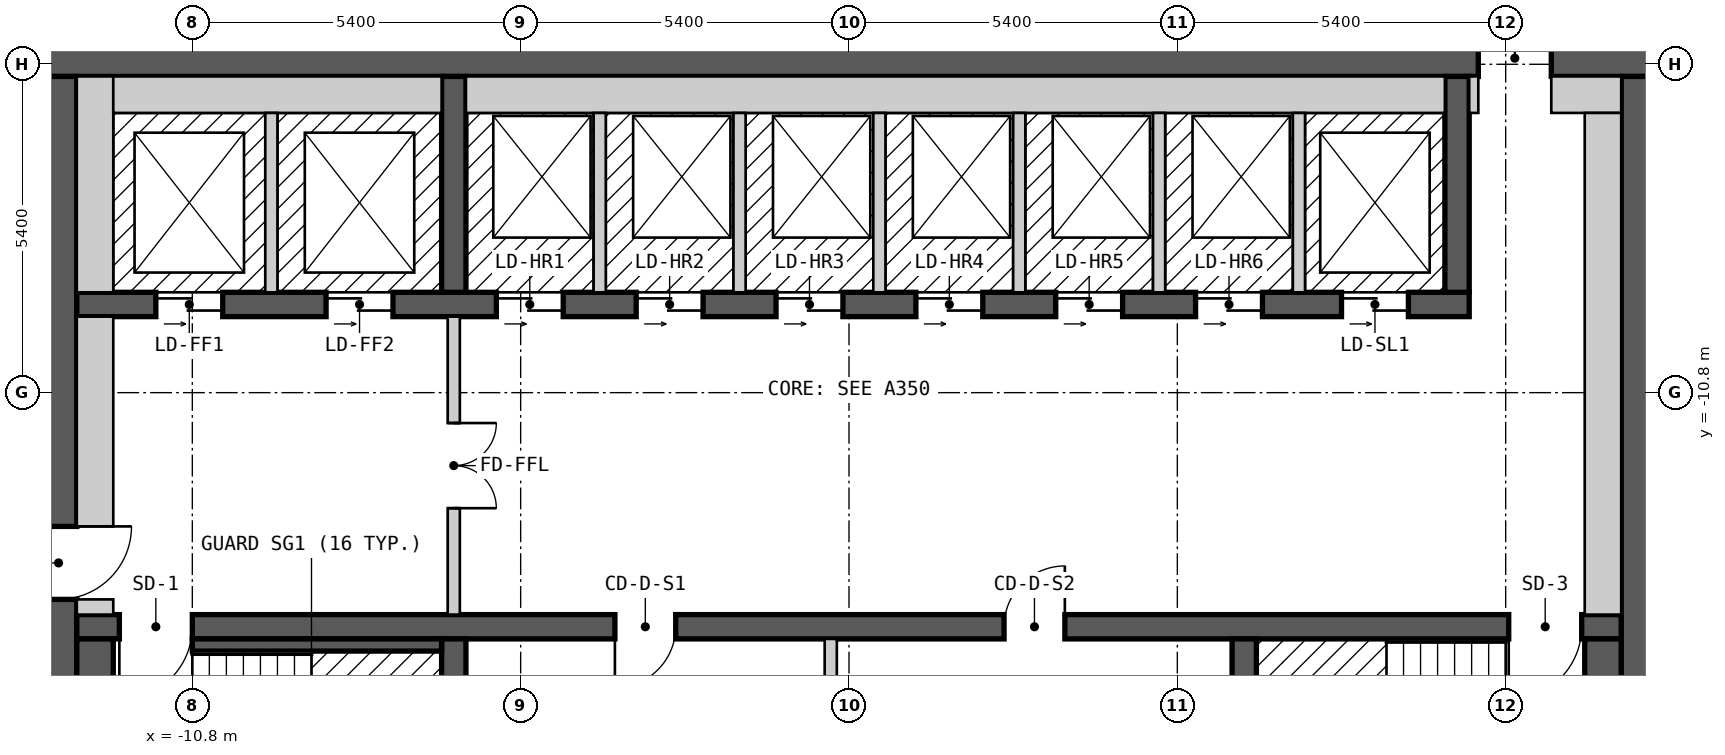
"""IFC4 building model, lengths in metres.
Left out: names, types, materials, properties, quantities, classifications, styles, units other than length and angle.
Written with IfcOpenShell. Run it as: python <this file> out.ifc"""

import sys

from ifc_helpers import new_model, si_unit, direction, frame, frame_2d, origin, place, context, subcontext, project, spatial, rectangle, extrude, element, fill, save


model = new_model("IFC4")
c1 = context("Model", 3, precision=1e-05, world=origin(), true_north=direction((0.0, 1.0)))
c2 = subcontext(c1, "Body", "Model", "MODEL_VIEW")
j1 = project(units=[si_unit("LENGTHUNIT", "METRE"), si_unit("PLANEANGLEUNIT", "RADIAN")], contexts=[c1])
p1 = place(None, origin())
s1 = spatial("IfcSite", under=j1, at=p1, CompositionType="ELEMENT")
p2 = place(p1, origin())
s2 = spatial("IfcBuilding", under=s1, at=p2, CompositionType="ELEMENT")
p3 = place(p2, frame((0.0, 0.0, 184.2)))
s3 = spatial("IfcBuildingStorey", under=s2, at=p3, CompositionType="ELEMENT", Elevation=184.2)
p4 = place(p3, frame((-13.3, -5.3, 0.0), z_axis=(0.0, 0.0, 1.0), x_axis=(1.0, 0.0, 0.0)))
e1 = element("IfcWall", 1, at=p4, inside=s3, PredefinedType="SHEAR", context=c2, shape_type="SweptSolid", body=[
    extrude(rectangle(XDim=26.6, YDim=0.6, at=frame_2d((13.3, 0.0))), origin(), (0.0, 0.0, 1.0), 2.7),
])
p5 = place(p4, frame((23.65, 0.0, 0.0)))
e2 = element("IfcOpeningElement", 2, at=p5, cuts=e1, PredefinedType="OPENING", context=c2, shape_type="SweptSolid", body=[
    extrude(rectangle(XDim=1.2, YDim=2.1, at=frame_2d((0.6, 1.05))), frame((0.0, 0.31, 0.0), z_axis=(0.0, -1.0, 0.0), x_axis=(1.0, 0.0, 0.0)), (0.0, 0.0, 1.0), 0.62),
])
p6 = place(p3, frame((-13.0, -18.4, 0.0), z_axis=(0.0, 0.0, 1.0), x_axis=(0.0, 1.0, 0.0)))
e3 = element("IfcWall", 3, at=p6, inside=s3, PredefinedType="SHEAR", context=c2, shape_type="SweptSolid", body=[
    extrude(rectangle(XDim=12.8, YDim=0.6, at=frame_2d((6.4, 0.0))), origin(), (0.0, 0.0, 1.0), 2.7),
])
p7 = place(p6, frame((4.2, 0.0, 0.0)))
e4 = element("IfcOpeningElement", 4, at=p7, cuts=e3, PredefinedType="OPENING", context=c2, shape_type="SweptSolid", body=[
    extrude(rectangle(XDim=1.2, YDim=2.1, at=frame_2d((0.6, 1.05))), frame((0.0, 0.31, 0.0), z_axis=(0.0, -1.0, 0.0), x_axis=(1.0, 0.0, 0.0)), (0.0, 0.0, 1.0), 0.62),
])
p8 = place(p3, frame((13.0, -18.4, 0.0), z_axis=(0.0, 0.0, 1.0), x_axis=(0.0, 1.0, 0.0)))
e5 = element("IfcWall", 5, at=p8, inside=s3, PredefinedType="SHEAR", context=c2, shape_type="SweptSolid", body=[
    extrude(rectangle(XDim=12.8, YDim=0.6, at=frame_2d((6.4, 0.0))), origin(), (0.0, 0.0, 1.0), 2.7),
])
p9 = place(p3, frame((-12.7, -14.65, 0.0), z_axis=(0.0, 0.0, 1.0), x_axis=(1.0, 0.0, 0.0)))
e6 = element("IfcWall", 6, at=p9, inside=s3, PredefinedType="SHEAR", context=c2, shape_type="SweptSolid", body=[
    extrude(rectangle(XDim=25.4, YDim=0.4, at=frame_2d((12.7, 0.0))), origin(), (0.0, 0.0, 1.0), 2.7),
])
p10 = place(p9, frame((1.9, 0.0, 0.0), z_axis=(0.0, 0.0, 1.0), x_axis=(-1.0, 0.0, 0.0)))
e7 = element("IfcOpeningElement", 7, at=p10, cuts=e6, PredefinedType="OPENING", context=c2, shape_type="SweptSolid", body=[
    extrude(rectangle(XDim=1.2, YDim=2.1, at=frame_2d((0.6, 1.05))), frame((0.0, 0.21, 0.0), z_axis=(0.0, -1.0, 0.0), x_axis=(1.0, 0.0, 0.0)), (0.0, 0.0, 1.0), 0.42),
])
p11 = place(p9, frame((24.75, 0.0, 0.0), z_axis=(0.0, 0.0, 1.0), x_axis=(-1.0, 0.0, 0.0)))
e8 = element("IfcOpeningElement", 8, at=p11, cuts=e6, PredefinedType="OPENING", context=c2, shape_type="SweptSolid", body=[
    extrude(rectangle(XDim=1.2, YDim=2.1, at=frame_2d((0.6, 1.05))), frame((0.0, 0.21, 0.0), z_axis=(0.0, -1.0, 0.0), x_axis=(1.0, 0.0, 0.0)), (0.0, 0.0, 1.0), 0.42),
])
p12 = place(p9, frame((9.85, 0.0, 0.0), z_axis=(0.0, 0.0, 1.0), x_axis=(-1.0, 0.0, 0.0)))
e9 = element("IfcOpeningElement", 9, at=p12, cuts=e6, PredefinedType="OPENING", context=c2, shape_type="SweptSolid", body=[
    extrude(rectangle(XDim=1.0, YDim=2.1, at=frame_2d((0.5, 1.05))), frame((0.0, 0.21, 0.0), z_axis=(0.0, -1.0, 0.0), x_axis=(1.0, 0.0, 0.0)), (0.0, 0.0, 1.0), 0.42),
])
p13 = place(p9, frame((16.25, 0.0, 0.0), z_axis=(0.0, 0.0, 1.0), x_axis=(-1.0, 0.0, 0.0)))
e10 = element("IfcOpeningElement", 10, at=p13, cuts=e6, PredefinedType="OPENING", context=c2, shape_type="SweptSolid", body=[
    extrude(rectangle(XDim=1.0, YDim=2.1, at=frame_2d((0.5, 1.05))), frame((0.0, 0.21, 0.0), z_axis=(0.0, -1.0, 0.0), x_axis=(1.0, 0.0, 0.0)), (0.0, 0.0, 1.0), 0.42),
])
p14 = place(p3, frame((-12.7, -9.35, 0.0), z_axis=(0.0, 0.0, 1.0), x_axis=(1.0, 0.0, 0.0)))
e11 = element("IfcWall", 11, at=p14, inside=s3, PredefinedType="SHEAR", context=c2, shape_type="SweptSolid", body=[
    extrude(rectangle(XDim=22.9, YDim=0.4, at=frame_2d((11.45, 0.0))), origin(), (0.0, 0.0, 1.0), 2.7),
])
p15 = place(p14, frame((1.3, 0.0, 0.0)))
e12 = element("IfcOpeningElement", 12, at=p15, cuts=e11, PredefinedType="OPENING", context=c2, shape_type="SweptSolid", body=[
    extrude(rectangle(XDim=1.1, YDim=2.1, at=frame_2d((0.55, 1.05))), frame((0.0, 0.21, 0.0), z_axis=(0.0, -1.0, 0.0), x_axis=(1.0, 0.0, 0.0)), (0.0, 0.0, 1.0), 0.42),
])
p16 = place(p14, frame((4.1, 0.0, 0.0)))
e13 = element("IfcOpeningElement", 13, at=p16, cuts=e11, PredefinedType="OPENING", context=c2, shape_type="SweptSolid", body=[
    extrude(rectangle(XDim=1.1, YDim=2.1, at=frame_2d((0.55, 1.05))), frame((0.0, 0.21, 0.0), z_axis=(0.0, -1.0, 0.0), x_axis=(1.0, 0.0, 0.0)), (0.0, 0.0, 1.0), 0.42),
])
p17 = place(p14, frame((6.9, 0.0, 0.0)))
e14 = element("IfcOpeningElement", 14, at=p17, cuts=e11, PredefinedType="OPENING", context=c2, shape_type="SweptSolid", body=[
    extrude(rectangle(XDim=1.1, YDim=2.1, at=frame_2d((0.55, 1.05))), frame((0.0, 0.21, 0.0), z_axis=(0.0, -1.0, 0.0), x_axis=(1.0, 0.0, 0.0)), (0.0, 0.0, 1.0), 0.42),
])
p18 = place(p14, frame((9.2, 0.0, 0.0)))
e15 = element("IfcOpeningElement", 15, at=p18, cuts=e11, PredefinedType="OPENING", context=c2, shape_type="SweptSolid", body=[
    extrude(rectangle(XDim=1.1, YDim=2.1, at=frame_2d((0.55, 1.05))), frame((0.0, 0.21, 0.0), z_axis=(0.0, -1.0, 0.0), x_axis=(1.0, 0.0, 0.0)), (0.0, 0.0, 1.0), 0.42),
])
p19 = place(p14, frame((11.5, 0.0, 0.0)))
e16 = element("IfcOpeningElement", 16, at=p19, cuts=e11, PredefinedType="OPENING", context=c2, shape_type="SweptSolid", body=[
    extrude(rectangle(XDim=1.1, YDim=2.1, at=frame_2d((0.55, 1.05))), frame((0.0, 0.21, 0.0), z_axis=(0.0, -1.0, 0.0), x_axis=(1.0, 0.0, 0.0)), (0.0, 0.0, 1.0), 0.42),
])
p20 = place(p14, frame((13.8, 0.0, 0.0)))
e17 = element("IfcOpeningElement", 17, at=p20, cuts=e11, PredefinedType="OPENING", context=c2, shape_type="SweptSolid", body=[
    extrude(rectangle(XDim=1.1, YDim=2.1, at=frame_2d((0.55, 1.05))), frame((0.0, 0.21, 0.0), z_axis=(0.0, -1.0, 0.0), x_axis=(1.0, 0.0, 0.0)), (0.0, 0.0, 1.0), 0.42),
])
p21 = place(p14, frame((16.1, 0.0, 0.0)))
e18 = element("IfcOpeningElement", 18, at=p21, cuts=e11, PredefinedType="OPENING", context=c2, shape_type="SweptSolid", body=[
    extrude(rectangle(XDim=1.1, YDim=2.1, at=frame_2d((0.55, 1.05))), frame((0.0, 0.21, 0.0), z_axis=(0.0, -1.0, 0.0), x_axis=(1.0, 0.0, 0.0)), (0.0, 0.0, 1.0), 0.42),
])
p22 = place(p14, frame((18.4, 0.0, 0.0)))
e19 = element("IfcOpeningElement", 19, at=p22, cuts=e11, PredefinedType="OPENING", context=c2, shape_type="SweptSolid", body=[
    extrude(rectangle(XDim=1.1, YDim=2.1, at=frame_2d((0.55, 1.05))), frame((0.0, 0.21, 0.0), z_axis=(0.0, -1.0, 0.0), x_axis=(1.0, 0.0, 0.0)), (0.0, 0.0, 1.0), 0.42),
])
p23 = place(p14, frame((20.8, 0.0, 0.0)))
e20 = element("IfcOpeningElement", 20, at=p23, cuts=e11, PredefinedType="OPENING", context=c2, shape_type="SweptSolid", body=[
    extrude(rectangle(XDim=1.1, YDim=2.1, at=frame_2d((0.55, 1.05))), frame((0.0, 0.21, 0.0), z_axis=(0.0, -1.0, 0.0), x_axis=(1.0, 0.0, 0.0)), (0.0, 0.0, 1.0), 0.42),
])
for number, where, z_axis, x_axis in (
    (21, (-6.5, -18.4, 0.0), (0.0, 0.0, 1.0), (0.0, 1.0, 0.0)),
    (22, (6.5, -18.4, 0.0), (0.0, 0.0, 1.0), (0.0, 1.0, 0.0)),
    (23, (-6.5, -9.15, 0.0), (0.0, 0.0, 1.0), (0.0, 1.0, 0.0)),
    (24, (10.0, -9.15, 0.0), (0.0, 0.0, 1.0), (0.0, 1.0, 0.0)),
):
    element("IfcWall", number, at=place(p3, frame(where, z_axis=z_axis, x_axis=x_axis)), inside=s3, PredefinedType="SHEAR", context=c2, shape_type="SweptSolid", body=[
        extrude(rectangle(XDim=3.55, YDim=0.4, at=frame_2d((1.775, 0.0))), origin(), (0.0, 0.0, 1.0), 2.7),
    ])
p24 = place(p3, frame((-12.4, -18.4, 0.0), z_axis=(0.0, 0.0, 1.0), x_axis=(0.0, 1.0, 0.0)))
e25 = element("IfcWall", 25, at=p24, inside=s3, PredefinedType="SOLIDWALL", context=c2, shape_type="SweptSolid", body=[
    extrude(rectangle(XDim=3.55, YDim=0.6, at=frame_2d((1.775, 0.0))), origin(), (0.0, 0.0, 1.0), 2.7),
])
p25 = place(p3, frame((-12.7, -14.325, 0.0), z_axis=(0.0, 0.0, 1.0), x_axis=(1.0, 0.0, 0.0)))
e26 = element("IfcWall", 26, at=p25, inside=s3, PredefinedType="PARTITIONING", context=c2, shape_type="SweptSolid", body=[
    extrude(rectangle(XDim=0.6, YDim=0.25, at=frame_2d((0.3, 0.0))), origin(), (0.0, 0.0, 1.0), 2.7),
])
p26 = place(p3, frame((-12.4, -13.0, 0.0), z_axis=(0.0, 0.0, 1.0), x_axis=(0.0, 1.0, 0.0)))
e27 = element("IfcWall", 27, at=p26, inside=s3, PredefinedType="PARTITIONING", context=c2, shape_type="SweptSolid", body=[
    extrude(rectangle(XDim=3.45, YDim=0.6, at=frame_2d((1.725, 0.0))), origin(), (0.0, 0.0, 1.0), 2.7),
])
p27 = place(p3, frame((-12.4, -9.15, 0.0), z_axis=(0.0, 0.0, 1.0), x_axis=(0.0, 1.0, 0.0)))
e28 = element("IfcWall", 28, at=p27, inside=s3, PredefinedType="SOLIDWALL", context=c2, shape_type="SweptSolid", body=[
    extrude(rectangle(XDim=3.55, YDim=0.6, at=frame_2d((1.775, 0.0))), origin(), (0.0, 0.0, 1.0), 2.7),
])
p28 = place(p3, frame((-12.1, -5.9, 0.0), z_axis=(0.0, 0.0, 1.0), x_axis=(1.0, 0.0, 0.0)))
e29 = element("IfcWall", 29, at=p28, inside=s3, PredefinedType="SOLIDWALL", context=c2, shape_type="SweptSolid", body=[
    extrude(rectangle(XDim=5.4, YDim=0.6, at=frame_2d((2.7, 0.0))), origin(), (0.0, 0.0, 1.0), 2.7),
])
p29 = place(p3, frame((-10.8, -14.95, 0.0), z_axis=(0.0, 0.0, 1.0), x_axis=(1.0, 0.0, 0.0)))
e30 = element("IfcWall", 30, at=p29, inside=s3, PredefinedType="SOLIDWALL", context=c2, shape_type="SweptSolid", body=[
    extrude(rectangle(XDim=4.1, YDim=0.2, at=frame_2d((2.05, 0.0))), origin(), (0.0, 0.0, 1.0), 2.7),
])
p30 = place(p3, frame((-9.5, -9.15, 0.0), z_axis=(0.0, 0.0, 1.0), x_axis=(0.0, 1.0, 0.0)))
e31 = element("IfcWall", 31, at=p30, inside=s3, PredefinedType="SOLIDWALL", context=c2, shape_type="SweptSolid", body=[
    extrude(rectangle(XDim=2.95, YDim=0.2, at=frame_2d((1.475, 0.0))), origin(), (0.0, 0.0, 1.0), 2.7),
])
p31 = place(p3, frame((-6.5, -14.45, 0.0), z_axis=(0.0, 0.0, 1.0), x_axis=(0.0, 1.0, 0.0)))
e32 = element("IfcWall", 32, at=p31, inside=s3, PredefinedType="PARTITIONING", context=c2, shape_type="SweptSolid", body=[
    extrude(rectangle(XDim=4.9, YDim=0.2, at=frame_2d((2.45, 0.0))), origin(), (0.0, 0.0, 1.0), 2.7),
])
p32 = place(p31, frame((3.15, 0.0, 0.0), z_axis=(0.0, 0.0, 1.0), x_axis=(-1.0, 0.0, 0.0)))
e33 = element("IfcOpeningElement", 33, at=p32, cuts=e32, PredefinedType="OPENING", context=c2, shape_type="SweptSolid", body=[
    extrude(rectangle(XDim=1.4, YDim=2.1, at=frame_2d((0.7, 1.05))), frame((0.0, 0.11, 0.0), z_axis=(0.0, -1.0, 0.0), x_axis=(1.0, 0.0, 0.0)), (0.0, 0.0, 1.0), 0.22),
])
p33 = place(p3, frame((-6.3, -5.9, 0.0), z_axis=(0.0, 0.0, 1.0), x_axis=(1.0, 0.0, 0.0)))
e34 = element("IfcWall", 34, at=p33, inside=s3, PredefinedType="SOLIDWALL", context=c2, shape_type="SweptSolid", body=[
    extrude(rectangle(XDim=16.1, YDim=0.6, at=frame_2d((8.05, 0.0))), origin(), (0.0, 0.0, 1.0), 2.7),
])
for number, where, z_axis, x_axis in (
    (35, (-4.1, -9.15, 0.0), (0.0, 0.0, 1.0), (0.0, 1.0, 0.0)),
    (36, (-1.8, -9.15, 0.0), (0.0, 0.0, 1.0), (0.0, 1.0, 0.0)),
):
    element("IfcWall", number, at=place(p3, frame(where, z_axis=z_axis, x_axis=x_axis)), inside=s3, PredefinedType="SOLIDWALL", context=c2, shape_type="SweptSolid", body=[
        extrude(rectangle(XDim=2.95, YDim=0.2, at=frame_2d((1.475, 0.0))), origin(), (0.0, 0.0, 1.0), 2.7),
    ])
p34 = place(p3, frame((-0.3, -17.8, 0.0), z_axis=(0.0, 0.0, 1.0), x_axis=(0.0, 1.0, 0.0)))
e37 = element("IfcWall", 37, at=p34, inside=s3, PredefinedType="PARTITIONING", context=c2, shape_type="SweptSolid", body=[
    extrude(rectangle(XDim=2.95, YDim=0.2, at=frame_2d((1.475, 0.0))), origin(), (0.0, 0.0, 1.0), 2.7),
])
for number, where, z_axis, x_axis in (
    (38, (0.5, -9.15, 0.0), (0.0, 0.0, 1.0), (0.0, 1.0, 0.0)),
    (39, (2.8, -9.15, 0.0), (0.0, 0.0, 1.0), (0.0, 1.0, 0.0)),
    (40, (5.1, -9.15, 0.0), (0.0, 0.0, 1.0), (0.0, 1.0, 0.0)),
    (41, (7.4, -9.15, 0.0), (0.0, 0.0, 1.0), (0.0, 1.0, 0.0)),
):
    element("IfcWall", number, at=place(p3, frame(where, z_axis=z_axis, x_axis=x_axis)), inside=s3, PredefinedType="SOLIDWALL", context=c2, shape_type="SweptSolid", body=[
        extrude(rectangle(XDim=2.95, YDim=0.2, at=frame_2d((1.475, 0.0))), origin(), (0.0, 0.0, 1.0), 2.7),
    ])
p35 = place(p3, frame((10.275, -6.2, 0.0), z_axis=(0.0, 0.0, 1.0), x_axis=(0.0, 1.0, 0.0)))
e42 = element("IfcWall", 42, at=p35, inside=s3, PredefinedType="PARTITIONING", context=c2, shape_type="SweptSolid", body=[
    extrude(rectangle(XDim=0.6, YDim=0.15, at=frame_2d((0.3, 0.0))), origin(), (0.0, 0.0, 1.0), 2.7),
])
p36 = place(p3, frame((11.55, -5.9, 0.0), z_axis=(0.0, 0.0, 1.0), x_axis=(1.0, 0.0, 0.0)))
e43 = element("IfcWall", 43, at=p36, inside=s3, PredefinedType="PARTITIONING", context=c2, shape_type="SweptSolid", body=[
    extrude(rectangle(XDim=1.15, YDim=0.6, at=frame_2d((0.575, 0.0))), origin(), (0.0, 0.0, 1.0), 2.7),
])
p37 = place(p3, frame((12.4, -17.6, 0.0), z_axis=(0.0, 0.0, 1.0), x_axis=(0.0, 1.0, 0.0)))
e44 = element("IfcWall", 44, at=p37, inside=s3, PredefinedType="SOLIDWALL", context=c2, shape_type="SweptSolid", body=[
    extrude(rectangle(XDim=2.75, YDim=0.6, at=frame_2d((1.375, 0.0))), origin(), (0.0, 0.0, 1.0), 2.7),
])
p38 = place(p3, frame((12.4, -14.45, 0.0), z_axis=(0.0, 0.0, 1.0), x_axis=(0.0, 1.0, 0.0)))
e45 = element("IfcWall", 45, at=p38, inside=s3, PredefinedType="PARTITIONING", context=c2, shape_type="SweptSolid", body=[
    extrude(rectangle(XDim=8.25, YDim=0.6, at=frame_2d((4.125, 0.0))), origin(), (0.0, 0.0, 1.0), 2.7),
])
p39 = place(p15, origin())
e46 = element("IfcDoor", 46, at=p39, inside=s3, OperationType="DOUBLE_DOOR_SLIDING", PredefinedType="DOOR", context=c2, shape_type="SweptSolid", body=[
    extrude(rectangle(XDim=1.1, YDim=2.1, at=frame_2d((0.55, 1.05))), frame((0.0, 0.025, 0.0), z_axis=(0.0, -1.0, 0.0), x_axis=(1.0, 0.0, 0.0)), (0.0, 0.0, 1.0), 0.05),
])
fill(e12, e46)
p40 = place(p16, origin())
e47 = element("IfcDoor", 47, at=p40, inside=s3, OperationType="DOUBLE_DOOR_SLIDING", PredefinedType="DOOR", context=c2, shape_type="SweptSolid", body=[
    extrude(rectangle(XDim=1.1, YDim=2.1, at=frame_2d((0.55, 1.05))), frame((0.0, 0.025, 0.0), z_axis=(0.0, -1.0, 0.0), x_axis=(1.0, 0.0, 0.0)), (0.0, 0.0, 1.0), 0.05),
])
fill(e13, e47)
p41 = place(p17, origin())
e48 = element("IfcDoor", 48, at=p41, inside=s3, OperationType="DOUBLE_DOOR_SLIDING", PredefinedType="DOOR", context=c2, shape_type="SweptSolid", body=[
    extrude(rectangle(XDim=1.1, YDim=2.1, at=frame_2d((0.55, 1.05))), frame((0.0, 0.025, 0.0), z_axis=(0.0, -1.0, 0.0), x_axis=(1.0, 0.0, 0.0)), (0.0, 0.0, 1.0), 0.05),
])
fill(e14, e48)
p42 = place(p18, origin())
e49 = element("IfcDoor", 49, at=p42, inside=s3, OperationType="DOUBLE_DOOR_SLIDING", PredefinedType="DOOR", context=c2, shape_type="SweptSolid", body=[
    extrude(rectangle(XDim=1.1, YDim=2.1, at=frame_2d((0.55, 1.05))), frame((0.0, 0.025, 0.0), z_axis=(0.0, -1.0, 0.0), x_axis=(1.0, 0.0, 0.0)), (0.0, 0.0, 1.0), 0.05),
])
fill(e15, e49)
p43 = place(p19, origin())
e50 = element("IfcDoor", 50, at=p43, inside=s3, OperationType="DOUBLE_DOOR_SLIDING", PredefinedType="DOOR", context=c2, shape_type="SweptSolid", body=[
    extrude(rectangle(XDim=1.1, YDim=2.1, at=frame_2d((0.55, 1.05))), frame((0.0, 0.025, 0.0), z_axis=(0.0, -1.0, 0.0), x_axis=(1.0, 0.0, 0.0)), (0.0, 0.0, 1.0), 0.05),
])
fill(e16, e50)
p44 = place(p20, origin())
e51 = element("IfcDoor", 51, at=p44, inside=s3, OperationType="DOUBLE_DOOR_SLIDING", PredefinedType="DOOR", context=c2, shape_type="SweptSolid", body=[
    extrude(rectangle(XDim=1.1, YDim=2.1, at=frame_2d((0.55, 1.05))), frame((0.0, 0.025, 0.0), z_axis=(0.0, -1.0, 0.0), x_axis=(1.0, 0.0, 0.0)), (0.0, 0.0, 1.0), 0.05),
])
fill(e17, e51)
p45 = place(p21, origin())
e52 = element("IfcDoor", 52, at=p45, inside=s3, OperationType="DOUBLE_DOOR_SLIDING", PredefinedType="DOOR", context=c2, shape_type="SweptSolid", body=[
    extrude(rectangle(XDim=1.1, YDim=2.1, at=frame_2d((0.55, 1.05))), frame((0.0, 0.025, 0.0), z_axis=(0.0, -1.0, 0.0), x_axis=(1.0, 0.0, 0.0)), (0.0, 0.0, 1.0), 0.05),
])
fill(e18, e52)
p46 = place(p22, origin())
e53 = element("IfcDoor", 53, at=p46, inside=s3, OperationType="DOUBLE_DOOR_SLIDING", PredefinedType="DOOR", context=c2, shape_type="SweptSolid", body=[
    extrude(rectangle(XDim=1.1, YDim=2.1, at=frame_2d((0.55, 1.05))), frame((0.0, 0.025, 0.0), z_axis=(0.0, -1.0, 0.0), x_axis=(1.0, 0.0, 0.0)), (0.0, 0.0, 1.0), 0.05),
])
fill(e19, e53)
p47 = place(p23, origin())
e54 = element("IfcDoor", 54, at=p47, inside=s3, OperationType="DOUBLE_DOOR_SLIDING", PredefinedType="DOOR", context=c2, shape_type="SweptSolid", body=[
    extrude(rectangle(XDim=1.1, YDim=2.1, at=frame_2d((0.55, 1.05))), frame((0.0, 0.025, 0.0), z_axis=(0.0, -1.0, 0.0), x_axis=(1.0, 0.0, 0.0)), (0.0, 0.0, 1.0), 0.05),
])
fill(e20, e54)
p48 = place(p10, origin())
e55 = element("IfcDoor", 55, at=p48, inside=s3, OperationType="SINGLE_SWING_RIGHT", PredefinedType="DOOR", context=c2, shape_type="SweptSolid", body=[
    extrude(rectangle(XDim=1.2, YDim=2.1, at=frame_2d((0.6, 1.05))), frame((0.0, 0.025, 0.0), z_axis=(0.0, -1.0, 0.0), x_axis=(1.0, 0.0, 0.0)), (0.0, 0.0, 1.0), 0.05),
])
fill(e7, e55)
p49 = place(p11, origin())
e56 = element("IfcDoor", 56, at=p49, inside=s3, OperationType="SINGLE_SWING_RIGHT", PredefinedType="DOOR", context=c2, shape_type="SweptSolid", body=[
    extrude(rectangle(XDim=1.2, YDim=2.1, at=frame_2d((0.6, 1.05))), frame((0.0, 0.025, 0.0), z_axis=(0.0, -1.0, 0.0), x_axis=(1.0, 0.0, 0.0)), (0.0, 0.0, 1.0), 0.05),
])
fill(e8, e56)
p50 = place(p7, origin())
e57 = element("IfcDoor", 57, at=p50, inside=s3, OperationType="SINGLE_SWING_RIGHT", PredefinedType="DOOR", context=c2, shape_type="SweptSolid", body=[
    extrude(rectangle(XDim=1.2, YDim=2.1, at=frame_2d((0.6, 1.05))), frame((0.0, 0.025, 0.0), z_axis=(0.0, -1.0, 0.0), x_axis=(1.0, 0.0, 0.0)), (0.0, 0.0, 1.0), 0.05),
])
fill(e4, e57)
p51 = place(p32, origin())
e58 = element("IfcDoor", 58, at=p51, inside=s3, OperationType="DOUBLE_DOOR_SINGLE_SWING", PredefinedType="DOOR", context=c2, shape_type="SweptSolid", body=[
    extrude(rectangle(XDim=1.4, YDim=2.1, at=frame_2d((0.7, 1.05))), frame((0.0, 0.025, 0.0), z_axis=(0.0, -1.0, 0.0), x_axis=(1.0, 0.0, 0.0)), (0.0, 0.0, 1.0), 0.05),
])
fill(e33, e58)
p52 = place(p5, origin())
e59 = element("IfcDoor", 59, at=p52, inside=s3, OperationType="DOUBLE_DOOR_SINGLE_SWING", PredefinedType="DOOR", context=c2, shape_type="SweptSolid", body=[
    extrude(rectangle(XDim=1.2, YDim=2.1, at=frame_2d((0.6, 1.05))), frame((0.0, 0.025, 0.0), z_axis=(0.0, -1.0, 0.0), x_axis=(1.0, 0.0, 0.0)), (0.0, 0.0, 1.0), 0.05),
])
fill(e2, e59)
p53 = place(p12, origin())
e60 = element("IfcDoor", 60, at=p53, inside=s3, OperationType="SINGLE_SWING_RIGHT", PredefinedType="DOOR", context=c2, shape_type="SweptSolid", body=[
    extrude(rectangle(XDim=1.0, YDim=2.1, at=frame_2d((0.5, 1.05))), frame((0.0, 0.025, 0.0), z_axis=(0.0, -1.0, 0.0), x_axis=(1.0, 0.0, 0.0)), (0.0, 0.0, 1.0), 0.05),
])
fill(e9, e60)
p54 = place(p13, origin())
e61 = element("IfcDoor", 61, at=p54, inside=s3, OperationType="SINGLE_SWING_LEFT", PredefinedType="DOOR", context=c2, shape_type="SweptSolid", body=[
    extrude(rectangle(XDim=1.0, YDim=2.1, at=frame_2d((0.5, 1.05))), frame((0.0, 0.025, 0.0), z_axis=(0.0, -1.0, 0.0), x_axis=(1.0, 0.0, 0.0)), (0.0, 0.0, 1.0), 0.05),
])
fill(e10, e61)
save(model, sys.argv[1])
